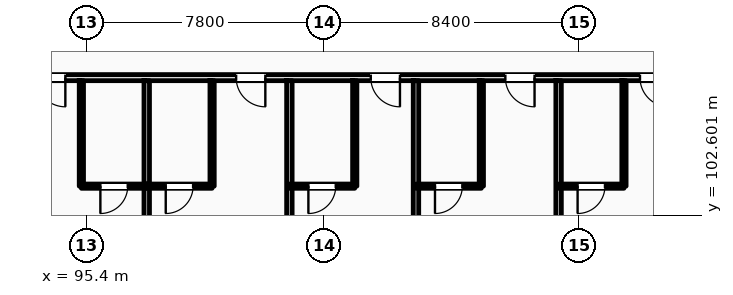
"""IFC4 building model, lengths in metres.
Left out: names, types, materials, properties, quantities, classifications, styles, units other than length and angle.
Written with IfcOpenShell. Run it as: python <this file> out.ifc"""

import sys

from ifc_helpers import new_model, si_unit, direction, frame, frame_2d, origin, place, context, subcontext, project, spatial, rectangle, extrude, element, fill, save


model = new_model("IFC4")
c1 = context("Model", 3, precision=1e-05, world=origin(), true_north=direction((0.0, 1.0)))
c2 = subcontext(c1, "Body", "Model", "MODEL_VIEW")
j1 = project(units=[si_unit("LENGTHUNIT", "METRE"), si_unit("PLANEANGLEUNIT", "RADIAN")], contexts=[c1])
p1 = place(None, origin())
s1 = spatial("IfcSite", under=j1, at=p1, CompositionType="ELEMENT")
p2 = place(p1, origin())
s2 = spatial("IfcBuilding", under=s1, at=p2, CompositionType="ELEMENT")
p3 = place(p2, frame((0.0, 0.0, 31.8)))
s3 = spatial("IfcBuildingStorey", under=s2, at=p3, CompositionType="ELEMENT", Elevation=31.8)
p4 = place(p3, frame((79.76, 107.12, 0.0), z_axis=(0.0, 0.0, 1.0), x_axis=(1.0, 0.0, 0.0)))
e1 = element("IfcWall", 1, at=p4, inside=s3, PredefinedType="PARTITIONING", context=c2, shape_type="SweptSolid", body=[
    extrude(rectangle(XDim=40.1, YDim=0.2, at=frame_2d((20.05, 0.0))), origin(), (0.0, 0.0, 1.0), 3.36),
])
p5 = place(p4, frame((2.887, 0.0, 0.0)))
e2 = element("IfcOpeningElement", 2, at=p5, cuts=e1, PredefinedType="OPENING", context=c2, shape_type="SweptSolid", body=[
    extrude(rectangle(XDim=0.96, YDim=2.2, at=frame_2d((0.48, 1.1))), frame((0.0, 0.11, 0.0), z_axis=(0.0, -1.0, 0.0), x_axis=(1.0, 0.0, 0.0)), (0.0, 0.0, 1.0), 0.22),
])
p6 = place(p4, frame((5.121, 0.0, 0.0)))
e3 = element("IfcOpeningElement", 3, at=p6, cuts=e1, PredefinedType="OPENING", context=c2, shape_type="SweptSolid", body=[
    extrude(rectangle(XDim=0.96, YDim=2.2, at=frame_2d((0.48, 1.1))), frame((0.0, 0.11, 0.0), z_axis=(0.0, -1.0, 0.0), x_axis=(1.0, 0.0, 0.0)), (0.0, 0.0, 1.0), 0.22),
])
p7 = place(p4, frame((11.698, 0.0, 0.0)))
e4 = element("IfcOpeningElement", 4, at=p7, cuts=e1, PredefinedType="OPENING", context=c2, shape_type="SweptSolid", body=[
    extrude(rectangle(XDim=0.96, YDim=2.2, at=frame_2d((0.48, 1.1))), frame((0.0, 0.11, 0.0), z_axis=(0.0, -1.0, 0.0), x_axis=(1.0, 0.0, 0.0)), (0.0, 0.0, 1.0), 0.22),
])
p8 = place(p4, frame((13.976, 0.0, 0.0)))
e5 = element("IfcOpeningElement", 5, at=p8, cuts=e1, PredefinedType="OPENING", context=c2, shape_type="SweptSolid", body=[
    extrude(rectangle(XDim=0.96, YDim=2.2, at=frame_2d((0.48, 1.1))), frame((0.0, 0.11, 0.0), z_axis=(0.0, -1.0, 0.0), x_axis=(1.0, 0.0, 0.0)), (0.0, 0.0, 1.0), 0.22),
])
p9 = place(p4, frame((20.554, 0.0, 0.0)))
e6 = element("IfcOpeningElement", 6, at=p9, cuts=e1, PredefinedType="OPENING", context=c2, shape_type="SweptSolid", body=[
    extrude(rectangle(XDim=0.96, YDim=2.2, at=frame_2d((0.48, 1.1))), frame((0.0, 0.11, 0.0), z_axis=(0.0, -1.0, 0.0), x_axis=(1.0, 0.0, 0.0)), (0.0, 0.0, 1.0), 0.22),
])
p10 = place(p4, frame((24.982, 0.0, 0.0)))
e7 = element("IfcOpeningElement", 7, at=p10, cuts=e1, PredefinedType="OPENING", context=c2, shape_type="SweptSolid", body=[
    extrude(rectangle(XDim=0.96, YDim=2.2, at=frame_2d((0.48, 1.1))), frame((0.0, 0.11, 0.0), z_axis=(0.0, -1.0, 0.0), x_axis=(1.0, 0.0, 0.0)), (0.0, 0.0, 1.0), 0.22),
])
p11 = place(p4, frame((29.409, 0.0, 0.0)))
e8 = element("IfcOpeningElement", 8, at=p11, cuts=e1, PredefinedType="OPENING", context=c2, shape_type="SweptSolid", body=[
    extrude(rectangle(XDim=0.96, YDim=2.2, at=frame_2d((0.48, 1.1))), frame((0.0, 0.11, 0.0), z_axis=(0.0, -1.0, 0.0), x_axis=(1.0, 0.0, 0.0)), (0.0, 0.0, 1.0), 0.22),
])
p12 = place(p4, frame((33.837, 0.0, 0.0)))
e9 = element("IfcOpeningElement", 9, at=p12, cuts=e1, PredefinedType="OPENING", context=c2, shape_type="SweptSolid", body=[
    extrude(rectangle(XDim=0.96, YDim=2.2, at=frame_2d((0.48, 1.1))), frame((0.0, 0.11, 0.0), z_axis=(0.0, -1.0, 0.0), x_axis=(1.0, 0.0, 0.0)), (0.0, 0.0, 1.0), 0.22),
])
p13 = place(p4, frame((36.027, 0.0, 0.0)))
e10 = element("IfcOpeningElement", 10, at=p13, cuts=e1, PredefinedType="OPENING", context=c2, shape_type="SweptSolid", body=[
    extrude(rectangle(XDim=0.96, YDim=2.2, at=frame_2d((0.48, 1.1))), frame((0.0, 0.11, 0.0), z_axis=(0.0, -1.0, 0.0), x_axis=(1.0, 0.0, 0.0)), (0.0, 0.0, 1.0), 0.22),
])
p14 = place(p3, frame((97.373, 96.14, 0.0), z_axis=(0.0, 0.0, 1.0), x_axis=(0.0, 1.0, 0.0)))
e11 = element("IfcWall", 11, at=p14, inside=s3, PredefinedType="PARTITIONING", context=c2, shape_type="SweptSolid", body=[
    extrude(rectangle(XDim=10.88, YDim=0.18, at=frame_2d((5.44, 0.0))), origin(), (0.0, 0.0, 1.0), 3.36),
])
p15 = place(p3, frame((95.223, 103.55, 0.0), z_axis=(0.0, 0.0, 1.0), x_axis=(0.0, 1.0, 0.0)))
e12 = element("IfcWall", 12, at=p15, inside=s3, PredefinedType="PARTITIONING", context=c2, shape_type="SweptSolid", body=[
    extrude(rectangle(XDim=3.47, YDim=0.14, at=frame_2d((1.735, 0.0))), origin(), (0.0, 0.0, 1.0), 2.91),
])
p16 = place(p3, frame((95.223, 103.55, 0.0), z_axis=(0.0, 0.0, 1.0), x_axis=(1.0, 0.0, 0.0)))
e13 = element("IfcWall", 13, at=p16, inside=s3, PredefinedType="PARTITIONING", context=c2, shape_type="SweptSolid", body=[
    extrude(rectangle(XDim=2.15, YDim=0.14, at=frame_2d((1.075, 0.0))), origin(), (0.0, 0.0, 1.0), 3.36),
])
p17 = place(p16, frame((0.625, 0.0, 0.0)))
e14 = element("IfcOpeningElement", 14, at=p17, cuts=e13, PredefinedType="OPENING", context=c2, shape_type="SweptSolid", body=[
    extrude(rectangle(XDim=0.9, YDim=2.1, at=frame_2d((0.45, 1.05))), frame((0.0, 0.08, 0.0), z_axis=(0.0, -1.0, 0.0), x_axis=(1.0, 0.0, 0.0)), (0.0, 0.0, 1.0), 0.16),
])
p18 = place(p3, frame((102.065, 96.14, 0.0), z_axis=(0.0, 0.0, 1.0), x_axis=(0.0, 1.0, 0.0)))
e15 = element("IfcWall", 15, at=p18, inside=s3, PredefinedType="PARTITIONING", context=c2, shape_type="SweptSolid", body=[
    extrude(rectangle(XDim=10.88, YDim=0.18, at=frame_2d((5.44, 0.0))), origin(), (0.0, 0.0, 1.0), 3.36),
])
p19 = place(p3, frame((99.523, 103.55, 0.0), z_axis=(0.0, 0.0, 1.0), x_axis=(0.0, 1.0, 0.0)))
e16 = element("IfcWall", 16, at=p19, inside=s3, PredefinedType="PARTITIONING", context=c2, shape_type="SweptSolid", body=[
    extrude(rectangle(XDim=3.47, YDim=0.14, at=frame_2d((1.735, 0.0))), origin(), (0.0, 0.0, 1.0), 3.36),
])
p20 = place(p3, frame((97.373, 103.55, 0.0), z_axis=(0.0, 0.0, 1.0), x_axis=(1.0, 0.0, 0.0)))
e17 = element("IfcWall", 17, at=p20, inside=s3, PredefinedType="PARTITIONING", context=c2, shape_type="SweptSolid", body=[
    extrude(rectangle(XDim=2.15, YDim=0.14, at=frame_2d((1.075, 0.0))), origin(), (0.0, 0.0, 1.0), 3.36),
])
p21 = place(p20, frame((0.625, 0.0, 0.0)))
e18 = element("IfcOpeningElement", 18, at=p21, cuts=e17, PredefinedType="OPENING", context=c2, shape_type="SweptSolid", body=[
    extrude(rectangle(XDim=0.9, YDim=2.1, at=frame_2d((0.45, 1.05))), frame((0.0, 0.08, 0.0), z_axis=(0.0, -1.0, 0.0), x_axis=(1.0, 0.0, 0.0)), (0.0, 0.0, 1.0), 0.16),
])
p22 = place(p3, frame((106.229, 96.14, 0.0), z_axis=(0.0, 0.0, 1.0), x_axis=(0.0, 1.0, 0.0)))
e19 = element("IfcWall", 19, at=p22, inside=s3, PredefinedType="PARTITIONING", context=c2, shape_type="SweptSolid", body=[
    extrude(rectangle(XDim=10.88, YDim=0.18, at=frame_2d((5.44, 0.0))), origin(), (0.0, 0.0, 1.0), 2.97),
])
p23 = place(p3, frame((104.215, 103.55, 0.0), z_axis=(0.0, 0.0, 1.0), x_axis=(0.0, 1.0, 0.0)))
e20 = element("IfcWall", 20, at=p23, inside=s3, PredefinedType="PARTITIONING", context=c2, shape_type="SweptSolid", body=[
    extrude(rectangle(XDim=3.47, YDim=0.14, at=frame_2d((1.735, 0.0))), origin(), (0.0, 0.0, 1.0), 3.36),
])
p24 = place(p3, frame((102.065, 103.55, 0.0), z_axis=(0.0, 0.0, 1.0), x_axis=(1.0, 0.0, 0.0)))
e21 = element("IfcWall", 21, at=p24, inside=s3, PredefinedType="PARTITIONING", context=c2, shape_type="SweptSolid", body=[
    extrude(rectangle(XDim=2.15, YDim=0.14, at=frame_2d((1.075, 0.0))), origin(), (0.0, 0.0, 1.0), 3.36),
])
p25 = place(p24, frame((0.625, 0.0, 0.0)))
e22 = element("IfcOpeningElement", 22, at=p25, cuts=e21, PredefinedType="OPENING", context=c2, shape_type="SweptSolid", body=[
    extrude(rectangle(XDim=0.9, YDim=2.1, at=frame_2d((0.45, 1.05))), frame((0.0, 0.08, 0.0), z_axis=(0.0, -1.0, 0.0), x_axis=(1.0, 0.0, 0.0)), (0.0, 0.0, 1.0), 0.16),
])
p26 = place(p3, frame((110.92, 96.14, 0.0), z_axis=(0.0, 0.0, 1.0), x_axis=(0.0, 1.0, 0.0)))
e23 = element("IfcWall", 23, at=p26, inside=s3, PredefinedType="PARTITIONING", context=c2, shape_type="SweptSolid", body=[
    extrude(rectangle(XDim=10.88, YDim=0.18, at=frame_2d((5.44, 0.0))), origin(), (0.0, 0.0, 1.0), 3.36),
])
p27 = place(p3, frame((108.379, 103.55, 0.0), z_axis=(0.0, 0.0, 1.0), x_axis=(0.0, 1.0, 0.0)))
e24 = element("IfcWall", 24, at=p27, inside=s3, PredefinedType="PARTITIONING", context=c2, shape_type="SweptSolid", body=[
    extrude(rectangle(XDim=3.47, YDim=0.14, at=frame_2d((1.735, 0.0))), origin(), (0.0, 0.0, 1.0), 3.36),
])
p28 = place(p3, frame((106.229, 103.55, 0.0), z_axis=(0.0, 0.0, 1.0), x_axis=(1.0, 0.0, 0.0)))
e25 = element("IfcWall", 25, at=p28, inside=s3, PredefinedType="PARTITIONING", context=c2, shape_type="SweptSolid", body=[
    extrude(rectangle(XDim=2.15, YDim=0.14, at=frame_2d((1.075, 0.0))), origin(), (0.0, 0.0, 1.0), 3.36),
])
p29 = place(p28, frame((0.625, 0.0, 0.0)))
e26 = element("IfcOpeningElement", 26, at=p29, cuts=e25, PredefinedType="OPENING", context=c2, shape_type="SweptSolid", body=[
    extrude(rectangle(XDim=0.9, YDim=2.1, at=frame_2d((0.45, 1.05))), frame((0.0, 0.08, 0.0), z_axis=(0.0, -1.0, 0.0), x_axis=(1.0, 0.0, 0.0)), (0.0, 0.0, 1.0), 0.16),
])
p30 = place(p3, frame((113.07, 103.55, 0.0), z_axis=(0.0, 0.0, 1.0), x_axis=(0.0, 1.0, 0.0)))
e27 = element("IfcWall", 27, at=p30, inside=s3, PredefinedType="PARTITIONING", context=c2, shape_type="SweptSolid", body=[
    extrude(rectangle(XDim=3.47, YDim=0.14, at=frame_2d((1.735, 0.0))), origin(), (0.0, 0.0, 1.0), 3.36),
])
p31 = place(p3, frame((110.92, 103.55, 0.0), z_axis=(0.0, 0.0, 1.0), x_axis=(1.0, 0.0, 0.0)))
e28 = element("IfcWall", 28, at=p31, inside=s3, PredefinedType="PARTITIONING", context=c2, shape_type="SweptSolid", body=[
    extrude(rectangle(XDim=2.15, YDim=0.14, at=frame_2d((1.075, 0.0))), origin(), (0.0, 0.0, 1.0), 3.36),
])
p32 = place(p31, frame((0.625, 0.0, 0.0)))
e29 = element("IfcOpeningElement", 29, at=p32, cuts=e28, PredefinedType="OPENING", context=c2, shape_type="SweptSolid", body=[
    extrude(rectangle(XDim=0.9, YDim=2.1, at=frame_2d((0.45, 1.05))), frame((0.0, 0.08, 0.0), z_axis=(0.0, -1.0, 0.0), x_axis=(1.0, 0.0, 0.0)), (0.0, 0.0, 1.0), 0.16),
])
p33 = place(p8, frame((0.96, 0.0, 0.0), z_axis=(0.0, 0.0, 1.0), x_axis=(-1.0, 0.0, 0.0)))
e30 = element("IfcDoor", 30, at=p33, inside=s3, OperationType="SINGLE_SWING_RIGHT", PredefinedType="DOOR", context=c2, shape_type="SweptSolid", body=[
    extrude(rectangle(XDim=0.96, YDim=2.2, at=frame_2d((0.48, 1.1))), frame((0.0, 0.025, 0.0), z_axis=(0.0, -1.0, 0.0), x_axis=(1.0, 0.0, 0.0)), (0.0, 0.0, 1.0), 0.05),
])
fill(e5, e30)
p34 = place(p17, frame((0.9, 0.0, 0.0), z_axis=(0.0, 0.0, 1.0), x_axis=(-1.0, 0.0, 0.0)))
e31 = element("IfcDoor", 31, at=p34, inside=s3, OperationType="SINGLE_SWING_LEFT", PredefinedType="DOOR", context=c2, shape_type="SweptSolid", body=[
    extrude(rectangle(XDim=0.9, YDim=2.1, at=frame_2d((0.45, 1.05))), frame((0.0, 0.025, 0.0), z_axis=(0.0, -1.0, 0.0), x_axis=(1.0, 0.0, 0.0)), (0.0, 0.0, 1.0), 0.05),
])
fill(e14, e31)
p35 = place(p9, frame((0.96, 0.0, 0.0), z_axis=(0.0, 0.0, 1.0), x_axis=(-1.0, 0.0, 0.0)))
e32 = element("IfcDoor", 32, at=p35, inside=s3, OperationType="SINGLE_SWING_RIGHT", PredefinedType="DOOR", context=c2, shape_type="SweptSolid", body=[
    extrude(rectangle(XDim=0.96, YDim=2.2, at=frame_2d((0.48, 1.1))), frame((0.0, 0.025, 0.0), z_axis=(0.0, -1.0, 0.0), x_axis=(1.0, 0.0, 0.0)), (0.0, 0.0, 1.0), 0.05),
])
fill(e6, e32)
p36 = place(p21, frame((0.9, 0.0, 0.0), z_axis=(0.0, 0.0, 1.0), x_axis=(-1.0, 0.0, 0.0)))
e33 = element("IfcDoor", 33, at=p36, inside=s3, OperationType="SINGLE_SWING_LEFT", PredefinedType="DOOR", context=c2, shape_type="SweptSolid", body=[
    extrude(rectangle(XDim=0.9, YDim=2.1, at=frame_2d((0.45, 1.05))), frame((0.0, 0.025, 0.0), z_axis=(0.0, -1.0, 0.0), x_axis=(1.0, 0.0, 0.0)), (0.0, 0.0, 1.0), 0.05),
])
fill(e18, e33)
p37 = place(p10, frame((0.96, 0.0, 0.0), z_axis=(0.0, 0.0, 1.0), x_axis=(-1.0, 0.0, 0.0)))
e34 = element("IfcDoor", 34, at=p37, inside=s3, OperationType="SINGLE_SWING_RIGHT", PredefinedType="DOOR", context=c2, shape_type="SweptSolid", body=[
    extrude(rectangle(XDim=0.96, YDim=2.2, at=frame_2d((0.48, 1.1))), frame((0.0, 0.025, 0.0), z_axis=(0.0, -1.0, 0.0), x_axis=(1.0, 0.0, 0.0)), (0.0, 0.0, 1.0), 0.05),
])
fill(e7, e34)
p38 = place(p25, frame((0.9, 0.0, 0.0), z_axis=(0.0, 0.0, 1.0), x_axis=(-1.0, 0.0, 0.0)))
e35 = element("IfcDoor", 35, at=p38, inside=s3, OperationType="SINGLE_SWING_LEFT", PredefinedType="DOOR", context=c2, shape_type="SweptSolid", body=[
    extrude(rectangle(XDim=0.9, YDim=2.1, at=frame_2d((0.45, 1.05))), frame((0.0, 0.025, 0.0), z_axis=(0.0, -1.0, 0.0), x_axis=(1.0, 0.0, 0.0)), (0.0, 0.0, 1.0), 0.05),
])
fill(e22, e35)
p39 = place(p11, frame((0.96, 0.0, 0.0), z_axis=(0.0, 0.0, 1.0), x_axis=(-1.0, 0.0, 0.0)))
e36 = element("IfcDoor", 36, at=p39, inside=s3, OperationType="SINGLE_SWING_RIGHT", PredefinedType="DOOR", context=c2, shape_type="SweptSolid", body=[
    extrude(rectangle(XDim=0.96, YDim=2.2, at=frame_2d((0.48, 1.1))), frame((0.0, 0.025, 0.0), z_axis=(0.0, -1.0, 0.0), x_axis=(1.0, 0.0, 0.0)), (0.0, 0.0, 1.0), 0.05),
])
fill(e8, e36)
p40 = place(p29, frame((0.9, 0.0, 0.0), z_axis=(0.0, 0.0, 1.0), x_axis=(-1.0, 0.0, 0.0)))
e37 = element("IfcDoor", 37, at=p40, inside=s3, OperationType="SINGLE_SWING_LEFT", PredefinedType="DOOR", context=c2, shape_type="SweptSolid", body=[
    extrude(rectangle(XDim=0.9, YDim=2.1, at=frame_2d((0.45, 1.05))), frame((0.0, 0.025, 0.0), z_axis=(0.0, -1.0, 0.0), x_axis=(1.0, 0.0, 0.0)), (0.0, 0.0, 1.0), 0.05),
])
fill(e26, e37)
p41 = place(p12, frame((0.96, 0.0, 0.0), z_axis=(0.0, 0.0, 1.0), x_axis=(-1.0, 0.0, 0.0)))
e38 = element("IfcDoor", 38, at=p41, inside=s3, OperationType="SINGLE_SWING_RIGHT", PredefinedType="DOOR", context=c2, shape_type="SweptSolid", body=[
    extrude(rectangle(XDim=0.96, YDim=2.2, at=frame_2d((0.48, 1.1))), frame((0.0, 0.025, 0.0), z_axis=(0.0, -1.0, 0.0), x_axis=(1.0, 0.0, 0.0)), (0.0, 0.0, 1.0), 0.05),
])
fill(e9, e38)
p42 = place(p32, frame((0.9, 0.0, 0.0), z_axis=(0.0, 0.0, 1.0), x_axis=(-1.0, 0.0, 0.0)))
e39 = element("IfcDoor", 39, at=p42, inside=s3, OperationType="SINGLE_SWING_LEFT", PredefinedType="DOOR", context=c2, shape_type="SweptSolid", body=[
    extrude(rectangle(XDim=0.9, YDim=2.1, at=frame_2d((0.45, 1.05))), frame((0.0, 0.025, 0.0), z_axis=(0.0, -1.0, 0.0), x_axis=(1.0, 0.0, 0.0)), (0.0, 0.0, 1.0), 0.05),
])
fill(e29, e39)
save(model, sys.argv[1])
